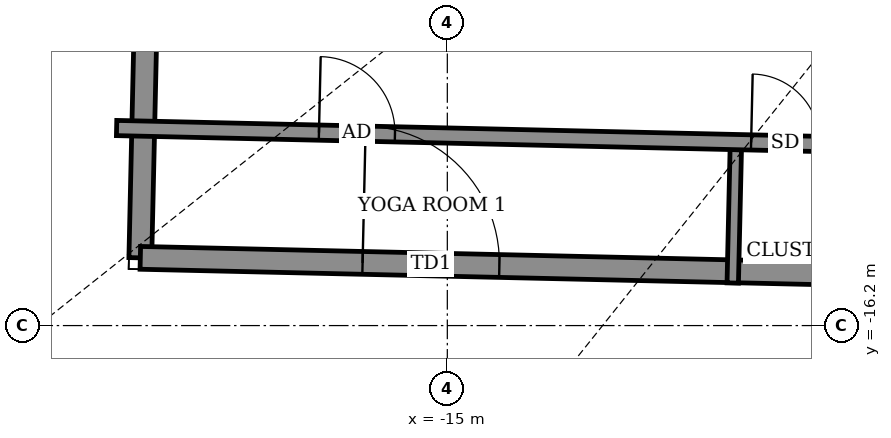
"""IFC4 building model, lengths in metres.
Left out: names, types, materials, properties, quantities, classifications, styles, units other than length and angle.
Written with IfcOpenShell. Run it as: python <this file> out.ifc"""

import sys

from ifc_helpers import new_model, si_unit, direction, frame, frame_2d, origin, place, context, subcontext, project, spatial, rectangle, extrude, element, fill, save


model = new_model("IFC4")
c1 = context("Model", 3, precision=1e-05, world=origin(), true_north=direction((0.0, 1.0)))
c2 = subcontext(c1, "Body", "Model", "MODEL_VIEW")
j1 = project(units=[si_unit("LENGTHUNIT", "METRE"), si_unit("PLANEANGLEUNIT", "RADIAN")], contexts=[c1])
p1 = place(None, origin())
s1 = spatial("IfcSite", under=j1, at=p1, CompositionType="ELEMENT")
p2 = place(p1, origin())
s2 = spatial("IfcBuilding", under=s1, at=p2, CompositionType="ELEMENT")
p3 = place(p2, frame((0.0, 0.0, 346.1)))
s3 = spatial("IfcBuildingStorey", under=s2, at=p3, CompositionType="ELEMENT", Elevation=346.1)
p4 = place(p3, frame((-18.958, -11.71, 0.0), z_axis=(0.0, 0.0, 1.0), x_axis=(-0.022514980321, -0.999746505701, 0.0)))
e1 = element("IfcWall", 1, at=p4, inside=s3, PredefinedType="SOLIDWALL", context=c2, shape_type="SweptSolid", body=[
    extrude(rectangle(XDim=3.6, YDim=0.3, at=frame_2d((1.8, 0.0))), origin(), (0.0, 0.0, 1.0), 2.85),
])
p5 = place(p3, frame((-19.039, -15.309, 0.0), z_axis=(0.0, 0.0, 1.0), x_axis=(0.999742787513, -0.022679480066, 0.0)))
e2 = element("IfcWall", 2, at=p5, inside=s3, PredefinedType="SOLIDWALL", context=c2, shape_type="SweptSolid", body=[
    extrude(rectangle(XDim=41.8, YDim=0.3, at=frame_2d((20.9, 0.0))), origin(), (0.0, 0.0, 1.0), 2.75),
])
p6 = place(p5, frame((2.925, 0.0, 0.0)))
e3 = element("IfcOpeningElement", 3, at=p6, cuts=e2, PredefinedType="OPENING", context=c2, shape_type="SweptSolid", body=[
    extrude(rectangle(XDim=1.8, YDim=2.4, at=frame_2d((0.9, 1.2))), frame((0.0, 0.16, 0.0), z_axis=(0.0, -1.0, 0.0), x_axis=(1.0, 0.0, 0.0)), (0.0, 0.0, 1.0), 0.32),
])
p7 = place(p5, frame((12.55, 0.0, 0.0)))
e4 = element("IfcOpeningElement", 4, at=p7, cuts=e2, PredefinedType="OPENING", context=c2, shape_type="SweptSolid", body=[
    extrude(rectangle(XDim=1.8, YDim=2.4, at=frame_2d((0.9, 1.2))), frame((0.0, 0.16, 0.0), z_axis=(0.0, -1.0, 0.0), x_axis=(1.0, 0.0, 0.0)), (0.0, 0.0, 1.0), 0.32),
])
p8 = place(p5, frame((18.575, 0.0, 0.0)))
e5 = element("IfcOpeningElement", 5, at=p8, cuts=e2, PredefinedType="OPENING", context=c2, shape_type="SweptSolid", body=[
    extrude(rectangle(XDim=1.8, YDim=2.4, at=frame_2d((0.9, 1.2))), frame((0.0, 0.16, 0.0), z_axis=(0.0, -1.0, 0.0), x_axis=(1.0, 0.0, 0.0)), (0.0, 0.0, 1.0), 0.32),
])
p9 = place(p5, frame((28.175, 0.0, 0.0)))
e6 = element("IfcOpeningElement", 6, at=p9, cuts=e2, PredefinedType="OPENING", context=c2, shape_type="SweptSolid", body=[
    extrude(rectangle(XDim=1.8, YDim=2.4, at=frame_2d((0.9, 1.2))), frame((0.0, 0.16, 0.0), z_axis=(0.0, -1.0, 0.0), x_axis=(1.0, 0.0, 0.0)), (0.0, 0.0, 1.0), 0.32),
])
p10 = place(p5, frame((37.526, 0.0, 0.0)))
e7 = element("IfcOpeningElement", 7, at=p10, cuts=e2, PredefinedType="OPENING", context=c2, shape_type="SweptSolid", body=[
    extrude(rectangle(XDim=1.8, YDim=2.4, at=frame_2d((0.9, 1.2))), frame((0.0, 0.16, 0.0), z_axis=(0.0, -1.0, 0.0), x_axis=(1.0, 0.0, 0.0)), (0.0, 0.0, 1.0), 0.32),
])
p11 = place(p3, frame((-11.245, -15.64, 0.0), z_axis=(0.0, 0.0, 1.0), x_axis=(0.022822561686, 0.999739531417, 0.0)))
e8 = element("IfcWall", 8, at=p11, inside=s3, PredefinedType="PARTITIONING", context=c2, shape_type="SweptSolid", body=[
    extrude(rectangle(XDim=1.754, YDim=0.15, at=frame_2d((0.877, 0.0))), origin(), (0.0, 0.0, 1.0), 2.85),
])
p12 = place(p3, frame((-19.351, -13.601, 0.0), z_axis=(0.0, 0.0, 1.0), x_axis=(0.999742592778, -0.02268806261, 0.0)))
e9 = element("IfcWall", 9, at=p12, inside=s3, PredefinedType="PARTITIONING", context=c2, shape_type="SweptSolid", body=[
    extrude(rectangle(XDim=40.417, YDim=0.2, at=frame_2d((20.209, 0.0))), origin(), (0.0, 0.0, 1.0), 2.85),
])
p13 = place(p12, frame((2.663, 0.0, 0.0)))
e10 = element("IfcOpeningElement", 10, at=p13, cuts=e9, PredefinedType="OPENING", context=c2, shape_type="SweptSolid", body=[
    extrude(rectangle(XDim=1.0, YDim=2.1, at=frame_2d((0.5, 1.05))), frame((0.0, 0.11, 0.0), z_axis=(0.0, -1.0, 0.0), x_axis=(1.0, 0.0, 0.0)), (0.0, 0.0, 1.0), 0.22),
])
p14 = place(p12, frame((11.296, 0.0, 0.0)))
e11 = element("IfcOpeningElement", 11, at=p14, cuts=e9, PredefinedType="OPENING", context=c2, shape_type="SweptSolid", body=[
    extrude(rectangle(XDim=1.0, YDim=2.1, at=frame_2d((0.5, 1.05))), frame((0.0, 0.11, 0.0), z_axis=(0.0, -1.0, 0.0), x_axis=(1.0, 0.0, 0.0)), (0.0, 0.0, 1.0), 0.22),
])
p15 = place(p12, frame((8.35, 0.0, 0.0)))
e12 = element("IfcOpeningElement", 12, at=p15, cuts=e9, PredefinedType="OPENING", context=c2, shape_type="SweptSolid", body=[
    extrude(rectangle(XDim=0.9, YDim=2.1, at=frame_2d((0.45, 1.05))), frame((0.0, 0.11, 0.0), z_axis=(0.0, -1.0, 0.0), x_axis=(1.0, 0.0, 0.0)), (0.0, 0.0, 1.0), 0.22),
])
p16 = place(p12, frame((17.319, 0.0, 0.0)))
e13 = element("IfcOpeningElement", 13, at=p16, cuts=e9, PredefinedType="OPENING", context=c2, shape_type="SweptSolid", body=[
    extrude(rectangle(XDim=1.0, YDim=2.1, at=frame_2d((0.5, 1.05))), frame((0.0, 0.11, 0.0), z_axis=(0.0, -1.0, 0.0), x_axis=(1.0, 0.0, 0.0)), (0.0, 0.0, 1.0), 0.22),
])
p17 = place(p12, frame((22.8, 0.0, 0.0)))
e14 = element("IfcOpeningElement", 14, at=p17, cuts=e9, PredefinedType="OPENING", context=c2, shape_type="SweptSolid", body=[
    extrude(rectangle(XDim=0.9, YDim=2.1, at=frame_2d((0.45, 1.05))), frame((0.0, 0.11, 0.0), z_axis=(0.0, -1.0, 0.0), x_axis=(1.0, 0.0, 0.0)), (0.0, 0.0, 1.0), 0.22),
])
p18 = place(p12, frame((27.8, 0.0, 0.0)))
e15 = element("IfcOpeningElement", 15, at=p18, cuts=e9, PredefinedType="OPENING", context=c2, shape_type="SweptSolid", body=[
    extrude(rectangle(XDim=1.0, YDim=2.1, at=frame_2d((0.5, 1.05))), frame((0.0, 0.11, 0.0), z_axis=(0.0, -1.0, 0.0), x_axis=(1.0, 0.0, 0.0)), (0.0, 0.0, 1.0), 0.22),
])
p19 = place(p12, frame((25.2, 0.0, 0.0)))
e16 = element("IfcOpeningElement", 16, at=p19, cuts=e9, PredefinedType="OPENING", context=c2, shape_type="SweptSolid", body=[
    extrude(rectangle(XDim=0.9, YDim=2.1, at=frame_2d((0.45, 1.05))), frame((0.0, 0.11, 0.0), z_axis=(0.0, -1.0, 0.0), x_axis=(1.0, 0.0, 0.0)), (0.0, 0.0, 1.0), 0.22),
])
p20 = place(p12, frame((31.45, 0.0, 0.0)))
e17 = element("IfcOpeningElement", 17, at=p20, cuts=e9, PredefinedType="OPENING", context=c2, shape_type="SweptSolid", body=[
    extrude(rectangle(XDim=1.0, YDim=2.1, at=frame_2d((0.5, 1.05))), frame((0.0, 0.11, 0.0), z_axis=(0.0, -1.0, 0.0), x_axis=(1.0, 0.0, 0.0)), (0.0, 0.0, 1.0), 0.22),
])
p21 = place(p12, frame((33.65, 0.0, 0.0)))
e18 = element("IfcOpeningElement", 18, at=p21, cuts=e9, PredefinedType="OPENING", context=c2, shape_type="SweptSolid", body=[
    extrude(rectangle(XDim=0.9, YDim=2.1, at=frame_2d((0.45, 1.05))), frame((0.0, 0.11, 0.0), z_axis=(0.0, -1.0, 0.0), x_axis=(1.0, 0.0, 0.0)), (0.0, 0.0, 1.0), 0.22),
])
p22 = place(p12, frame((36.523, 0.0, 0.0)))
e19 = element("IfcOpeningElement", 19, at=p22, cuts=e9, PredefinedType="OPENING", context=c2, shape_type="SweptSolid", body=[
    extrude(rectangle(XDim=1.0, YDim=2.1, at=frame_2d((0.5, 1.05))), frame((0.0, 0.11, 0.0), z_axis=(0.0, -1.0, 0.0), x_axis=(1.0, 0.0, 0.0)), (0.0, 0.0, 1.0), 0.22),
])
p23 = place(p6, origin())
e20 = element("IfcDoor", 20, at=p23, inside=s3, OperationType="DOUBLE_DOOR_SINGLE_SWING", PredefinedType="DOOR", context=c2, shape_type="SweptSolid", body=[
    extrude(rectangle(XDim=1.8, YDim=2.4, at=frame_2d((0.9, 1.2))), frame((0.0, 0.025, 0.0), z_axis=(0.0, -1.0, 0.0), x_axis=(1.0, 0.0, 0.0)), (0.0, 0.0, 1.0), 0.05),
])
fill(e3, e20)
p24 = place(p13, origin())
e21 = element("IfcDoor", 21, at=p24, inside=s3, OperationType="SINGLE_SWING_LEFT", PredefinedType="DOOR", context=c2, shape_type="SweptSolid", body=[
    extrude(rectangle(XDim=1.0, YDim=2.1, at=frame_2d((0.5, 1.05))), frame((0.0, 0.025, 0.0), z_axis=(0.0, -1.0, 0.0), x_axis=(1.0, 0.0, 0.0)), (0.0, 0.0, 1.0), 0.05),
])
fill(e10, e21)
p25 = place(p15, origin())
e22 = element("IfcDoor", 22, at=p25, inside=s3, OperationType="SINGLE_SWING_LEFT", PredefinedType="DOOR", context=c2, shape_type="SweptSolid", body=[
    extrude(rectangle(XDim=0.9, YDim=2.1, at=frame_2d((0.45, 1.05))), frame((0.0, 0.025, 0.0), z_axis=(0.0, -1.0, 0.0), x_axis=(1.0, 0.0, 0.0)), (0.0, 0.0, 1.0), 0.05),
])
fill(e12, e22)
save(model, sys.argv[1])
